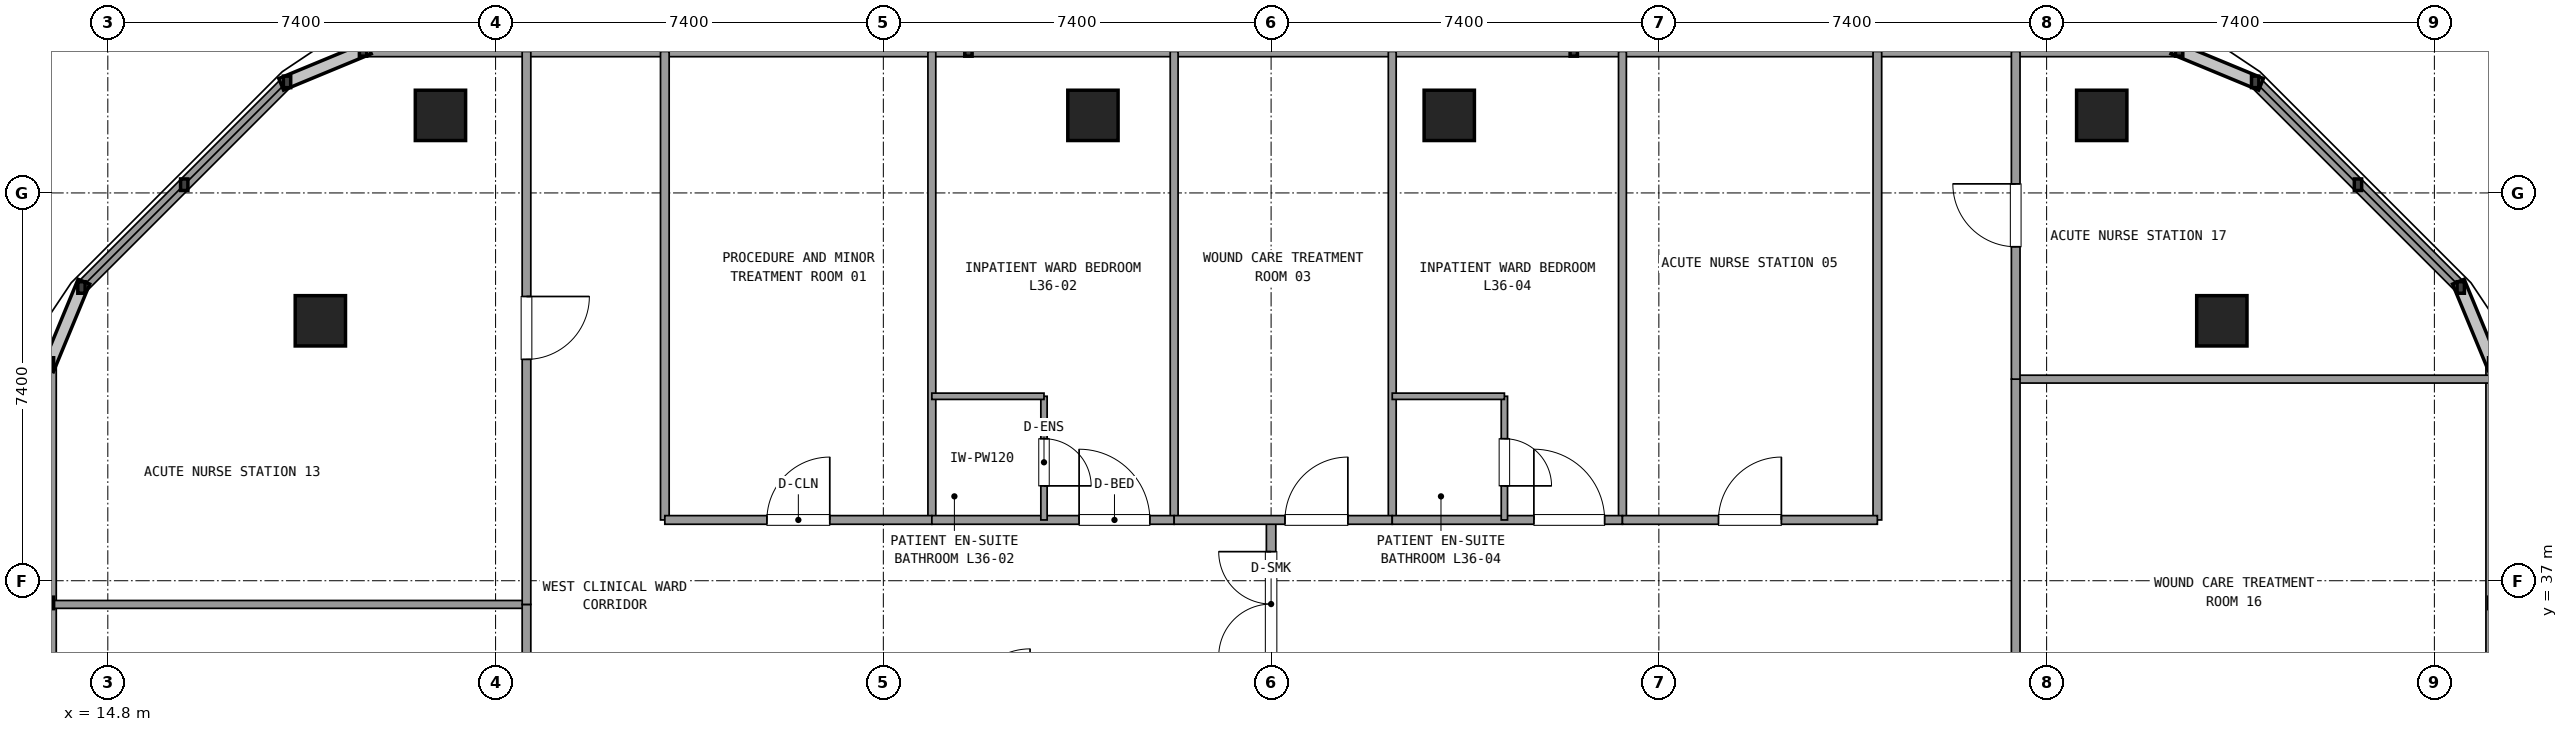
"""IFC4 building model, lengths in metres.
Left out: names, types, materials, properties, quantities, classifications, styles, units other than length and angle.
Written with IfcOpenShell. Run it as: python <this file> out.ifc"""

import sys

from ifc_helpers import new_model, si_unit, direction, frame, frame_2d, origin, origin_2d, place, context, subcontext, project, spatial, rectangle, extrude, element, fill, save


model = new_model("IFC4")
c1 = context("Model", 3, precision=1e-05, world=origin(), true_north=direction((0.0, 1.0)))
c2 = subcontext(c1, "Body", "Model", "MODEL_VIEW")
j1 = project(units=[si_unit("LENGTHUNIT", "METRE"), si_unit("PLANEANGLEUNIT", "RADIAN")], contexts=[c1])
p1 = place(None, origin())
s1 = spatial("IfcSite", under=j1, at=p1, CompositionType="ELEMENT")
p2 = place(p1, origin())
s2 = spatial("IfcBuilding", under=s1, at=p2, CompositionType="ELEMENT")
p3 = place(p2, frame((0.0, 0.0, 142.02)))
s3 = spatial("IfcBuildingStorey", under=s2, at=p3, CompositionType="ELEMENT", Elevation=142.02)
for number, where, z_axis, x_axis in (
    (1, (55.144, 41.96, 0.0), (0.0, 0.0, 1.0), (1.0, 0.0, 0.0)),
    (2, (52.852, 45.88, 0.0), (0.0, 0.0, 1.0), (1.0, 0.0, 0.0)),
    (3, (40.4, 45.88, 0.0), (0.0, 0.0, 1.0), (1.0, 0.0, 0.0)),
    (4, (33.6, 45.88, 0.0), (0.0, 0.0, 1.0), (1.0, 0.0, 0.0)),
    (5, (21.148, 45.88, 0.0), (0.0, 0.0, 1.0), (1.0, 0.0, 0.0)),
    (6, (18.856, 41.96, 0.0), (0.0, 0.0, 1.0), (1.0, 0.0, 0.0)),
):
    element("IfcColumn", number, at=place(p3, frame(where, z_axis=z_axis, x_axis=x_axis)), inside=s3, PredefinedType="COLUMN", context=c2, shape_type="SweptSolid", body=[
        extrude(rectangle(XDim=0.96, YDim=0.96, at=origin_2d()), origin(), (0.0, 0.0, 1.0), 3.6),
    ])
p4 = place(p3, frame((60.304, 27.44, 0.0), z_axis=(0.0, 0.0, 1.0), x_axis=(0.0, 1.0, 0.0)))
e7 = element("IfcWall", 7, at=p4, inside=s3, PredefinedType="SOLIDWALL", context=c2, shape_type="SweptSolid", body=[
    extrude(rectangle(XDim=13.705, YDim=0.24, at=frame_2d((6.853, 0.0))), origin(), (0.0, 0.0, 1.0), 0.85),
])
p5 = place(p3, frame((59.703, 42.596, 0.0), z_axis=(0.0, 0.0, 1.0), x_axis=(-0.707084777957, 0.707128783731, 0.0)))
e8 = element("IfcWall", 8, at=p5, inside=s3, PredefinedType="SOLIDWALL", context=c2, shape_type="SweptSolid", body=[
    extrude(rectangle(XDim=5.548, YDim=0.24, at=frame_2d((2.774, 0.0))), origin(), (0.0, 0.0, 1.0), 0.85),
])
p6 = place(p3, frame((54.329, 47.12, 0.0), z_axis=(0.0, 0.0, 1.0), x_axis=(-1.0, 0.0, 0.0)))
e9 = element("IfcWall", 9, at=p6, inside=s3, PredefinedType="SOLIDWALL", context=c2, shape_type="SweptSolid", body=[
    extrude(rectangle(XDim=34.658, YDim=0.24, at=frame_2d((17.329, 0.0))), origin(), (0.0, 0.0, 1.0), 0.85),
])
p7 = place(p3, frame((18.22, 46.519, 0.0), z_axis=(0.0, 0.0, 1.0), x_axis=(-0.707084777957, -0.707128783731, 0.0)))
e10 = element("IfcWall", 10, at=p7, inside=s3, PredefinedType="SOLIDWALL", context=c2, shape_type="SweptSolid", body=[
    extrude(rectangle(XDim=5.548, YDim=0.24, at=frame_2d((2.774, 0.0))), origin(), (0.0, 0.0, 1.0), 0.85),
])
p8 = place(p3, frame((13.696, 41.145, 0.0), z_axis=(0.0, 0.0, 1.0), x_axis=(0.0, -1.0, 0.0)))
e11 = element("IfcWall", 11, at=p8, inside=s3, PredefinedType="SOLIDWALL", context=c2, shape_type="SweptSolid", body=[
    extrude(rectangle(XDim=13.705, YDim=0.24, at=frame_2d((6.853, 0.0))), origin(), (0.0, 0.0, 1.0), 0.85),
])
p9 = place(p3, frame((37.0, 34.95, 0.0), z_axis=(0.0, 0.0, 1.0), x_axis=(0.0, 1.0, 0.0)))
e12 = element("IfcWall", 12, at=p9, inside=s3, PredefinedType="PARTITIONING", context=c2, shape_type="SweptSolid", body=[
    extrude(rectangle(XDim=3.21, YDim=0.18, at=frame_2d((1.605, 0.0))), origin(), (0.0, 0.0, 1.0), 2.61),
])
p10 = place(p9, frame((0.605, 0.0, 0.0)))
e13 = element("IfcOpeningElement", 13, at=p10, cuts=e12, PredefinedType="OPENING", context=c2, shape_type="SweptSolid", body=[
    extrude(rectangle(XDim=2.0, YDim=2.2, at=frame_2d((1.0, 1.1))), frame((0.0, 0.1, 0.0), z_axis=(0.0, -1.0, 0.0), x_axis=(1.0, 0.0, 0.0)), (0.0, 0.0, 1.0), 0.2),
])
for number, where, z_axis, x_axis in (
    (14, (25.43, 38.16, 0.0), (0.0, 0.0, 1.0), (0.0, 1.0, 0.0)),
    (15, (48.57, 38.16, 0.0), (0.0, 0.0, 1.0), (0.0, 1.0, 0.0)),
):
    element("IfcWall", number, at=place(p3, frame(where, z_axis=z_axis, x_axis=x_axis)), inside=s3, PredefinedType="PARTITIONING", context=c2, shape_type="SweptSolid", body=[
        extrude(rectangle(XDim=8.94, YDim=0.165, at=frame_2d((4.47, 0.0))), origin(), (0.0, 0.0, 1.0), 2.61),
    ])
p11 = place(p3, frame((30.526, 38.16, 0.0), z_axis=(0.0, 0.0, 1.0), x_axis=(0.0, 1.0, 0.0)))
e16 = element("IfcWall", 16, at=p11, inside=s3, PredefinedType="PARTITIONING", context=c2, shape_type="SweptSolid", body=[
    extrude(rectangle(XDim=8.94, YDim=0.15, at=frame_2d((4.47, 0.0))), origin(), (0.0, 0.0, 1.0), 2.61),
])
p12 = place(p3, frame((25.43, 38.16, 0.0), z_axis=(0.0, 0.0, 1.0), x_axis=(1.0, 0.0, 0.0)))
e17 = element("IfcWall", 17, at=p12, inside=s3, PredefinedType="PARTITIONING", context=c2, shape_type="SweptSolid", body=[
    extrude(rectangle(XDim=5.096, YDim=0.165, at=frame_2d((2.548, 0.0))), origin(), (0.0, 0.0, 1.0), 2.61),
])
p13 = place(p12, frame((1.948, 0.0, 0.0)))
e18 = element("IfcOpeningElement", 18, at=p13, cuts=e17, PredefinedType="OPENING", context=c2, shape_type="SweptSolid", body=[
    extrude(rectangle(XDim=1.2, YDim=2.15, at=frame_2d((0.6, 1.075))), frame((0.0, 0.093, 0.0), z_axis=(0.0, -1.0, 0.0), x_axis=(1.0, 0.0, 0.0)), (0.0, 0.0, 1.0), 0.185),
])
p14 = place(p3, frame((35.15, 38.16, 0.0), z_axis=(0.0, 0.0, 1.0), x_axis=(0.0, 1.0, 0.0)))
e19 = element("IfcWall", 19, at=p14, inside=s3, PredefinedType="PARTITIONING", context=c2, shape_type="SweptSolid", body=[
    extrude(rectangle(XDim=8.94, YDim=0.15, at=frame_2d((4.47, 0.0))), origin(), (0.0, 0.0, 1.0), 2.61),
])
p15 = place(p3, frame((30.526, 38.16, 0.0), z_axis=(0.0, 0.0, 1.0), x_axis=(1.0, 0.0, 0.0)))
e20 = element("IfcWall", 20, at=p15, inside=s3, PredefinedType="PARTITIONING", context=c2, shape_type="SweptSolid", body=[
    extrude(rectangle(XDim=4.624, YDim=0.165, at=frame_2d((2.312, 0.0))), origin(), (0.0, 0.0, 1.0), 2.61),
])
p16 = place(p15, frame((2.81, 0.0, 0.0)))
e21 = element("IfcOpeningElement", 21, at=p16, cuts=e20, PredefinedType="OPENING", context=c2, shape_type="SweptSolid", body=[
    extrude(rectangle(XDim=1.35, YDim=2.15, at=frame_2d((0.675, 1.075))), frame((0.0, 0.093, 0.0), z_axis=(0.0, -1.0, 0.0), x_axis=(1.0, 0.0, 0.0)), (0.0, 0.0, 1.0), 0.185),
])
p17 = place(p3, frame((32.666, 38.16, 0.0), z_axis=(0.0, 0.0, 1.0), x_axis=(0.0, 1.0, 0.0)))
e22 = element("IfcWall", 22, at=p17, inside=s3, PredefinedType="PLUMBINGWALL", context=c2, shape_type="SweptSolid", body=[
    extrude(rectangle(XDim=2.36, YDim=0.12, at=frame_2d((1.18, 0.0))), origin(), (0.0, 0.0, 1.0), 2.61),
])
p18 = place(p17, frame((0.65, 0.0, 0.0)))
e23 = element("IfcOpeningElement", 23, at=p18, cuts=e22, PredefinedType="OPENING", context=c2, shape_type="SweptSolid", body=[
    extrude(rectangle(XDim=0.9, YDim=2.1, at=frame_2d((0.45, 1.05))), frame((0.0, 0.07, 0.0), z_axis=(0.0, -1.0, 0.0), x_axis=(1.0, 0.0, 0.0)), (0.0, 0.0, 1.0), 0.14),
])
p19 = place(p3, frame((30.526, 40.52, 0.0), z_axis=(0.0, 0.0, 1.0), x_axis=(1.0, 0.0, 0.0)))
e24 = element("IfcWall", 24, at=p19, inside=s3, PredefinedType="PLUMBINGWALL", context=c2, shape_type="SweptSolid", body=[
    extrude(rectangle(XDim=2.14, YDim=0.12, at=frame_2d((1.07, 0.0))), origin(), (0.0, 0.0, 1.0), 2.61),
])
p20 = place(p3, frame((39.312, 38.16, 0.0), z_axis=(0.0, 0.0, 1.0), x_axis=(0.0, 1.0, 0.0)))
e25 = element("IfcWall", 25, at=p20, inside=s3, PredefinedType="PARTITIONING", context=c2, shape_type="SweptSolid", body=[
    extrude(rectangle(XDim=8.94, YDim=0.15, at=frame_2d((4.47, 0.0))), origin(), (0.0, 0.0, 1.0), 2.61),
])
p21 = place(p3, frame((35.15, 38.16, 0.0), z_axis=(0.0, 0.0, 1.0), x_axis=(1.0, 0.0, 0.0)))
e26 = element("IfcWall", 26, at=p21, inside=s3, PredefinedType="PARTITIONING", context=c2, shape_type="SweptSolid", body=[
    extrude(rectangle(XDim=4.162, YDim=0.165, at=frame_2d((2.081, 0.0))), origin(), (0.0, 0.0, 1.0), 2.61),
])
p22 = place(p21, frame((2.115, 0.0, 0.0)))
e27 = element("IfcOpeningElement", 27, at=p22, cuts=e26, PredefinedType="OPENING", context=c2, shape_type="SweptSolid", body=[
    extrude(rectangle(XDim=1.2, YDim=2.15, at=frame_2d((0.6, 1.075))), frame((0.0, 0.093, 0.0), z_axis=(0.0, -1.0, 0.0), x_axis=(1.0, 0.0, 0.0)), (0.0, 0.0, 1.0), 0.185),
])
p23 = place(p3, frame((43.705, 38.16, 0.0), z_axis=(0.0, 0.0, 1.0), x_axis=(0.0, 1.0, 0.0)))
e28 = element("IfcWall", 28, at=p23, inside=s3, PredefinedType="PARTITIONING", context=c2, shape_type="SweptSolid", body=[
    extrude(rectangle(XDim=8.94, YDim=0.15, at=frame_2d((4.47, 0.0))), origin(), (0.0, 0.0, 1.0), 2.61),
])
p24 = place(p3, frame((39.312, 38.16, 0.0), z_axis=(0.0, 0.0, 1.0), x_axis=(1.0, 0.0, 0.0)))
e29 = element("IfcWall", 29, at=p24, inside=s3, PredefinedType="PARTITIONING", context=c2, shape_type="SweptSolid", body=[
    extrude(rectangle(XDim=4.393, YDim=0.165, at=frame_2d((2.197, 0.0))), origin(), (0.0, 0.0, 1.0), 2.61),
])
p25 = place(p24, frame((2.703, 0.0, 0.0)))
e30 = element("IfcOpeningElement", 30, at=p25, cuts=e29, PredefinedType="OPENING", context=c2, shape_type="SweptSolid", body=[
    extrude(rectangle(XDim=1.35, YDim=2.15, at=frame_2d((0.675, 1.075))), frame((0.0, 0.093, 0.0), z_axis=(0.0, -1.0, 0.0), x_axis=(1.0, 0.0, 0.0)), (0.0, 0.0, 1.0), 0.185),
])
p26 = place(p3, frame((41.452, 38.16, 0.0), z_axis=(0.0, 0.0, 1.0), x_axis=(0.0, 1.0, 0.0)))
e31 = element("IfcWall", 31, at=p26, inside=s3, PredefinedType="PLUMBINGWALL", context=c2, shape_type="SweptSolid", body=[
    extrude(rectangle(XDim=2.36, YDim=0.12, at=frame_2d((1.18, 0.0))), origin(), (0.0, 0.0, 1.0), 2.61),
])
p27 = place(p26, frame((0.65, 0.0, 0.0)))
e32 = element("IfcOpeningElement", 32, at=p27, cuts=e31, PredefinedType="OPENING", context=c2, shape_type="SweptSolid", body=[
    extrude(rectangle(XDim=0.9, YDim=2.1, at=frame_2d((0.45, 1.05))), frame((0.0, 0.07, 0.0), z_axis=(0.0, -1.0, 0.0), x_axis=(1.0, 0.0, 0.0)), (0.0, 0.0, 1.0), 0.14),
])
p28 = place(p3, frame((39.312, 40.52, 0.0), z_axis=(0.0, 0.0, 1.0), x_axis=(1.0, 0.0, 0.0)))
e33 = element("IfcWall", 33, at=p28, inside=s3, PredefinedType="PLUMBINGWALL", context=c2, shape_type="SweptSolid", body=[
    extrude(rectangle(XDim=2.14, YDim=0.12, at=frame_2d((1.07, 0.0))), origin(), (0.0, 0.0, 1.0), 2.61),
])
p29 = place(p3, frame((43.705, 38.16, 0.0), z_axis=(0.0, 0.0, 1.0), x_axis=(1.0, 0.0, 0.0)))
e34 = element("IfcWall", 34, at=p29, inside=s3, PredefinedType="PARTITIONING", context=c2, shape_type="SweptSolid", body=[
    extrude(rectangle(XDim=4.865, YDim=0.165, at=frame_2d((2.433, 0.0))), origin(), (0.0, 0.0, 1.0), 2.61),
])
p30 = place(p29, frame((1.833, 0.0, 0.0)))
e35 = element("IfcOpeningElement", 35, at=p30, cuts=e34, PredefinedType="OPENING", context=c2, shape_type="SweptSolid", body=[
    extrude(rectangle(XDim=1.2, YDim=2.15, at=frame_2d((0.6, 1.075))), frame((0.0, 0.093, 0.0), z_axis=(0.0, -1.0, 0.0), x_axis=(1.0, 0.0, 0.0)), (0.0, 0.0, 1.0), 0.185),
])
p31 = place(p3, frame((22.79, 36.548, 0.0), z_axis=(0.0, 0.0, 1.0), x_axis=(-1.0, 0.0, 0.0)))
e36 = element("IfcWall", 36, at=p31, inside=s3, PredefinedType="PARTITIONING", context=c2, shape_type="SweptSolid", body=[
    extrude(rectangle(XDim=9.074, YDim=0.15, at=frame_2d((4.537, 0.0))), origin(), (0.0, 0.0, 1.0), 2.61),
])
p32 = place(p3, frame((22.79, 27.56, 0.0), z_axis=(0.0, 0.0, 1.0), x_axis=(0.0, 1.0, 0.0)))
e37 = element("IfcWall", 37, at=p32, inside=s3, PredefinedType="PARTITIONING", context=c2, shape_type="SweptSolid", body=[
    extrude(rectangle(XDim=8.988, YDim=0.165, at=frame_2d((4.494, 0.0))), origin(), (0.0, 0.0, 1.0), 2.61),
])
p33 = place(p32, frame((3.894, 0.0, 0.0)))
e38 = element("IfcOpeningElement", 38, at=p33, cuts=e37, PredefinedType="OPENING", context=c2, shape_type="SweptSolid", body=[
    extrude(rectangle(XDim=1.2, YDim=2.15, at=frame_2d((0.6, 1.075))), frame((0.0, 0.093, 0.0), z_axis=(0.0, -1.0, 0.0), x_axis=(1.0, 0.0, 0.0)), (0.0, 0.0, 1.0), 0.185),
])
p34 = place(p3, frame((22.79, 36.548, 0.0), z_axis=(0.0, 0.0, 1.0), x_axis=(0.0, 1.0, 0.0)))
e39 = element("IfcWall", 39, at=p34, inside=s3, PredefinedType="PARTITIONING", context=c2, shape_type="SweptSolid", body=[
    extrude(rectangle(XDim=10.552, YDim=0.165, at=frame_2d((5.276, 0.0))), origin(), (0.0, 0.0, 1.0), 2.61),
])
p35 = place(p34, frame((4.676, 0.0, 0.0)))
e40 = element("IfcOpeningElement", 40, at=p35, cuts=e39, PredefinedType="OPENING", context=c2, shape_type="SweptSolid", body=[
    extrude(rectangle(XDim=1.2, YDim=2.15, at=frame_2d((0.6, 1.075))), frame((0.0, 0.093, 0.0), z_axis=(0.0, -1.0, 0.0), x_axis=(1.0, 0.0, 0.0)), (0.0, 0.0, 1.0), 0.185),
])
p36 = place(p3, frame((51.21, 40.847, 0.0), z_axis=(0.0, 0.0, 1.0), x_axis=(1.0, 0.0, 0.0)))
e41 = element("IfcWall", 41, at=p36, inside=s3, PredefinedType="PARTITIONING", context=c2, shape_type="SweptSolid", body=[
    extrude(rectangle(XDim=9.074, YDim=0.15, at=frame_2d((4.537, 0.0))), origin(), (0.0, 0.0, 1.0), 2.61),
])
p37 = place(p3, frame((51.21, 27.56, 0.0), z_axis=(0.0, 0.0, 1.0), x_axis=(0.0, 1.0, 0.0)))
e42 = element("IfcWall", 42, at=p37, inside=s3, PredefinedType="PARTITIONING", context=c2, shape_type="SweptSolid", body=[
    extrude(rectangle(XDim=13.287, YDim=0.165, at=frame_2d((6.644, 0.0))), origin(), (0.0, 0.0, 1.0), 2.61),
])
p38 = place(p37, frame((6.044, 0.0, 0.0)))
e43 = element("IfcOpeningElement", 43, at=p38, cuts=e42, PredefinedType="OPENING", context=c2, shape_type="SweptSolid", body=[
    extrude(rectangle(XDim=1.2, YDim=2.15, at=frame_2d((0.6, 1.075))), frame((0.0, 0.093, 0.0), z_axis=(0.0, -1.0, 0.0), x_axis=(1.0, 0.0, 0.0)), (0.0, 0.0, 1.0), 0.185),
])
p39 = place(p3, frame((51.21, 40.847, 0.0), z_axis=(0.0, 0.0, 1.0), x_axis=(0.0, 1.0, 0.0)))
e44 = element("IfcWall", 44, at=p39, inside=s3, PredefinedType="PARTITIONING", context=c2, shape_type="SweptSolid", body=[
    extrude(rectangle(XDim=6.253, YDim=0.165, at=frame_2d((3.126, 0.0))), origin(), (0.0, 0.0, 1.0), 2.61),
])
p40 = place(p39, frame((2.526, 0.0, 0.0)))
e45 = element("IfcOpeningElement", 45, at=p40, cuts=e44, PredefinedType="OPENING", context=c2, shape_type="SweptSolid", body=[
    extrude(rectangle(XDim=1.2, YDim=2.15, at=frame_2d((0.6, 1.075))), frame((0.0, 0.093, 0.0), z_axis=(0.0, -1.0, 0.0), x_axis=(1.0, 0.0, 0.0)), (0.0, 0.0, 1.0), 0.185),
])
p41 = place(p10, origin())
e46 = element("IfcDoor", 46, at=p41, inside=s3, OperationType="DOUBLE_DOOR_SINGLE_SWING", PredefinedType="DOOR", context=c2, shape_type="SweptSolid", body=[
    extrude(rectangle(XDim=2.0, YDim=2.2, at=frame_2d((1.0, 1.1))), frame((0.0, 0.025, 0.0), z_axis=(0.0, -1.0, 0.0), x_axis=(1.0, 0.0, 0.0)), (0.0, 0.0, 1.0), 0.05),
])
fill(e13, e46)
p42 = place(p13, origin())
e47 = element("IfcDoor", 47, at=p42, inside=s3, OperationType="SINGLE_SWING_RIGHT", PredefinedType="DOOR", context=c2, shape_type="SweptSolid", body=[
    extrude(rectangle(XDim=1.2, YDim=2.15, at=frame_2d((0.6, 1.075))), frame((0.0, 0.025, 0.0), z_axis=(0.0, -1.0, 0.0), x_axis=(1.0, 0.0, 0.0)), (0.0, 0.0, 1.0), 0.05),
])
fill(e18, e47)
p43 = place(p18, frame((0.9, 0.0, 0.0), z_axis=(0.0, 0.0, 1.0), x_axis=(-1.0, 0.0, 0.0)))
e48 = element("IfcDoor", 48, at=p43, inside=s3, OperationType="SINGLE_SWING_LEFT", PredefinedType="DOOR", context=c2, shape_type="SweptSolid", body=[
    extrude(rectangle(XDim=0.9, YDim=2.1, at=frame_2d((0.45, 1.05))), frame((0.0, 0.025, 0.0), z_axis=(0.0, -1.0, 0.0), x_axis=(1.0, 0.0, 0.0)), (0.0, 0.0, 1.0), 0.05),
])
fill(e23, e48)
p44 = place(p16, origin())
e49 = element("IfcDoor", 49, at=p44, inside=s3, OperationType="SINGLE_SWING_LEFT", PredefinedType="DOOR", context=c2, shape_type="SweptSolid", body=[
    extrude(rectangle(XDim=1.35, YDim=2.15, at=frame_2d((0.675, 1.075))), frame((0.0, 0.025, 0.0), z_axis=(0.0, -1.0, 0.0), x_axis=(1.0, 0.0, 0.0)), (0.0, 0.0, 1.0), 0.05),
])
fill(e21, e49)
p45 = place(p22, origin())
e50 = element("IfcDoor", 50, at=p45, inside=s3, OperationType="SINGLE_SWING_RIGHT", PredefinedType="DOOR", context=c2, shape_type="SweptSolid", body=[
    extrude(rectangle(XDim=1.2, YDim=2.15, at=frame_2d((0.6, 1.075))), frame((0.0, 0.025, 0.0), z_axis=(0.0, -1.0, 0.0), x_axis=(1.0, 0.0, 0.0)), (0.0, 0.0, 1.0), 0.05),
])
fill(e27, e50)
p46 = place(p27, frame((0.9, 0.0, 0.0), z_axis=(0.0, 0.0, 1.0), x_axis=(-1.0, 0.0, 0.0)))
e51 = element("IfcDoor", 51, at=p46, inside=s3, OperationType="SINGLE_SWING_LEFT", PredefinedType="DOOR", context=c2, shape_type="SweptSolid", body=[
    extrude(rectangle(XDim=0.9, YDim=2.1, at=frame_2d((0.45, 1.05))), frame((0.0, 0.025, 0.0), z_axis=(0.0, -1.0, 0.0), x_axis=(1.0, 0.0, 0.0)), (0.0, 0.0, 1.0), 0.05),
])
fill(e32, e51)
p47 = place(p25, origin())
e52 = element("IfcDoor", 52, at=p47, inside=s3, OperationType="SINGLE_SWING_LEFT", PredefinedType="DOOR", context=c2, shape_type="SweptSolid", body=[
    extrude(rectangle(XDim=1.35, YDim=2.15, at=frame_2d((0.675, 1.075))), frame((0.0, 0.025, 0.0), z_axis=(0.0, -1.0, 0.0), x_axis=(1.0, 0.0, 0.0)), (0.0, 0.0, 1.0), 0.05),
])
fill(e30, e52)
p48 = place(p30, origin())
e53 = element("IfcDoor", 53, at=p48, inside=s3, OperationType="SINGLE_SWING_RIGHT", PredefinedType="DOOR", context=c2, shape_type="SweptSolid", body=[
    extrude(rectangle(XDim=1.2, YDim=2.15, at=frame_2d((0.6, 1.075))), frame((0.0, 0.025, 0.0), z_axis=(0.0, -1.0, 0.0), x_axis=(1.0, 0.0, 0.0)), (0.0, 0.0, 1.0), 0.05),
])
fill(e35, e53)
p49 = place(p35, frame((1.2, 0.0, 0.0), z_axis=(0.0, 0.0, 1.0), x_axis=(-1.0, 0.0, 0.0)))
e54 = element("IfcDoor", 54, at=p49, inside=s3, OperationType="SINGLE_SWING_RIGHT", PredefinedType="DOOR", context=c2, shape_type="SweptSolid", body=[
    extrude(rectangle(XDim=1.2, YDim=2.15, at=frame_2d((0.6, 1.075))), frame((0.0, 0.025, 0.0), z_axis=(0.0, -1.0, 0.0), x_axis=(1.0, 0.0, 0.0)), (0.0, 0.0, 1.0), 0.05),
])
fill(e40, e54)
p50 = place(p40, origin())
e55 = element("IfcDoor", 55, at=p50, inside=s3, OperationType="SINGLE_SWING_RIGHT", PredefinedType="DOOR", context=c2, shape_type="SweptSolid", body=[
    extrude(rectangle(XDim=1.2, YDim=2.15, at=frame_2d((0.6, 1.075))), frame((0.0, 0.025, 0.0), z_axis=(0.0, -1.0, 0.0), x_axis=(1.0, 0.0, 0.0)), (0.0, 0.0, 1.0), 0.05),
])
fill(e45, e55)
save(model, sys.argv[1])
